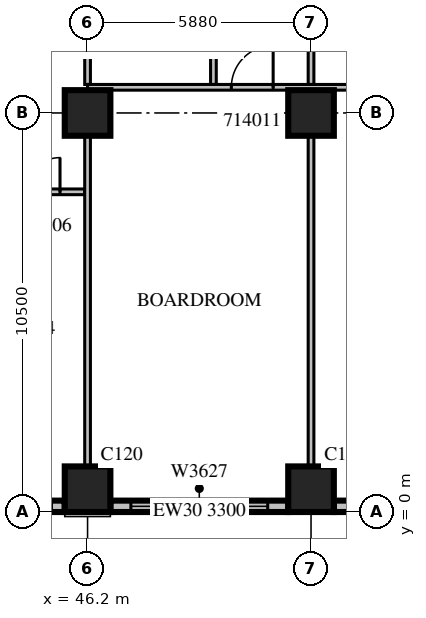
"""IFC4 building model, lengths in metres.
Left out: names, types, materials, properties, quantities, classifications, styles, units other than length and angle.
Written with IfcOpenShell. Run it as: python <this file> out.ifc"""

import sys

from ifc_helpers import new_model, si_unit, direction, frame, frame_2d, origin, origin_2d, place, context, subcontext, project, spatial, rectangle, extrude, source, transform, mapped, element, fill, save


model = new_model("IFC4")
c1 = context("Model", 3, precision=1e-05, world=origin(), true_north=direction((0.0, 1.0)))
c2 = subcontext(c1, "Body", "Model", "MODEL_VIEW")
j1 = project(units=[si_unit("LENGTHUNIT", "METRE"), si_unit("PLANEANGLEUNIT", "RADIAN")], contexts=[c1])
p1 = place(None, origin())
s1 = spatial("IfcSite", under=j1, at=p1, CompositionType="ELEMENT")
p2 = place(p1, origin())
s2 = spatial("IfcBuilding", under=s1, at=p2, CompositionType="ELEMENT")
p3 = place(p2, frame((0.0, 0.0, 69.9)))
s3 = spatial("IfcBuildingStorey", under=s2, at=p3, CompositionType="ELEMENT", Elevation=69.9)
m1 = source(origin(), c2, "Body", "SweptSolid", [
    extrude(rectangle(XDim=1.2, YDim=1.2, at=origin_2d()), origin(), (0.0, 0.0, 1.0), 4.2),
])
for number, where, z_axis, x_axis in (
    (1, (46.2, 0.6, 0.0), (0.0, 0.0, 1.0), (1.0, 0.0, 0.0)),
    (2, (52.08, 0.6, 0.0), (0.0, 0.0, 1.0), (1.0, 0.0, 0.0)),
    (3, (46.2, 10.5, 0.0), (0.0, 0.0, 1.0), (1.0, 0.0, 0.0)),
    (4, (52.08, 10.5, 0.0), (0.0, 0.0, 1.0), (1.0, 0.0, 0.0)),
):
    element("IfcColumn", number, at=place(p3, frame(where, z_axis=z_axis, x_axis=x_axis)), inside=s3, PredefinedType="COLUMN", context=c2, shape_type="MappedRepresentation", body=[
        mapped(m1, transform((0.0, 0.0, 0.0), scale=1.0)),
    ])
m2 = source(origin(), c2, "Body", "SweptSolid", [
    extrude(rectangle(XDim=1.6, YDim=0.3, at=frame_2d((0.8, 0.0))), origin(), (0.0, 0.0, 1.0), 3.8),
])
p4 = place(p3, frame((44.0, 0.15, 0.0), z_axis=(0.0, 0.0, 1.0), x_axis=(1.0, 0.0, 0.0)))
e5 = element("IfcWall", 5, at=p4, inside=s3, PredefinedType="STANDARD", context=c2, shape_type="MappedRepresentation", body=[
    mapped(m2, transform((0.0, 0.0, 0.0), scale=1.0)),
])
m3 = source(origin(), c2, "Body", "SweptSolid", [
    extrude(rectangle(XDim=0.9, YDim=2.7, at=frame_2d((0.45, 1.35))), frame((0.0, 0.16, 0.0), z_axis=(0.0, -1.0, 0.0), x_axis=(1.0, 0.0, 0.0)), (0.0, 0.0, 1.0), 0.32),
])
p5 = place(p4, frame((0.35, 0.0, 0.6)))
e6 = element("IfcOpeningElement", 6, at=p5, cuts=e5, PredefinedType="OPENING", context=c2, shape_type="MappedRepresentation", body=[
    mapped(m3, transform((0.0, 0.0, 0.0), scale=1.0)),
])
m4 = source(origin(), c2, "Body", "SweptSolid", [
    extrude(rectangle(XDim=4.68, YDim=0.3, at=frame_2d((2.34, 0.0))), origin(), (0.0, 0.0, 1.0), 3.3),
])
p6 = place(p3, frame((46.8, 0.15, 0.0), z_axis=(0.0, 0.0, 1.0), x_axis=(1.0, 0.0, 0.0)))
e7 = element("IfcWall", 7, at=p6, inside=s3, PredefinedType="STANDARD", context=c2, shape_type="MappedRepresentation", body=[
    mapped(m4, transform((0.0, 0.0, 0.0), scale=1.0)),
])
m5 = source(origin(), c2, "Body", "SweptSolid", [
    extrude(rectangle(XDim=3.6, YDim=2.7, at=frame_2d((1.8, 1.35))), frame((0.0, 0.16, 0.0), z_axis=(0.0, -1.0, 0.0), x_axis=(1.0, 0.0, 0.0)), (0.0, 0.0, 1.0), 0.32),
])
p7 = place(p6, frame((0.54, 0.0, 0.6)))
e8 = element("IfcOpeningElement", 8, at=p7, cuts=e7, PredefinedType="OPENING", context=c2, shape_type="MappedRepresentation", body=[
    mapped(m5, transform((0.0, 0.0, 0.0), scale=1.0)),
])
m6 = source(origin(), c2, "Body", "SweptSolid", [
    extrude(rectangle(XDim=4.68, YDim=0.3, at=frame_2d((2.34, 0.0))), origin(), (0.0, 0.0, 1.0), 3.8),
])
p8 = place(p3, frame((52.68, 0.15, 0.0), z_axis=(0.0, 0.0, 1.0), x_axis=(1.0, 0.0, 0.0)))
e9 = element("IfcWall", 9, at=p8, inside=s3, PredefinedType="STANDARD", context=c2, shape_type="MappedRepresentation", body=[
    mapped(m6, transform((0.0, 0.0, 0.0), scale=1.0)),
])
p9 = place(p8, frame((0.54, 0.0, 0.6)))
e10 = element("IfcOpeningElement", 10, at=p9, cuts=e9, PredefinedType="OPENING", context=c2, shape_type="MappedRepresentation", body=[
    mapped(m5, transform((0.0, 0.0, 0.0), scale=1.0)),
])
m7 = source(origin(), c2, "Body", "SweptSolid", [
    extrude(rectangle(XDim=2.2, YDim=0.15, at=frame_2d((1.1, 0.0))), origin(), (0.0, 0.0, 1.0), 3.8),
])
p10 = place(p3, frame((46.125, 8.425, 0.0), z_axis=(0.0, 0.0, 1.0), x_axis=(-1.0, 0.0, 0.0)))
e11 = element("IfcWall", 11, at=p10, inside=s3, PredefinedType="PARTITIONING", context=c2, shape_type="MappedRepresentation", body=[
    mapped(m7, transform((0.0, 0.0, 0.0), scale=1.0)),
])
m8 = source(origin(), c2, "Body", "SweptSolid", [
    extrude(rectangle(XDim=0.9, YDim=2.1, at=frame_2d((0.45, 1.05))), frame((0.0, 0.085, 0.0), z_axis=(0.0, -1.0, 0.0), x_axis=(1.0, 0.0, 0.0)), (0.0, 0.0, 1.0), 0.17),
])
p11 = place(p10, frame((0.65, 0.0, 0.0)))
e12 = element("IfcOpeningElement", 12, at=p11, cuts=e11, PredefinedType="OPENING", context=c2, shape_type="MappedRepresentation", body=[
    mapped(m8, transform((0.0, 0.0, 0.0), scale=1.0)),
])
m9 = source(origin(), c2, "Body", "SweptSolid", [
    extrude(rectangle(XDim=3.75, YDim=0.15, at=frame_2d((1.875, 0.0))), origin(), (0.0, 0.0, 1.0), 3.8),
])
p12 = place(p3, frame((49.512, 11.25, 0.0), z_axis=(0.0, 0.0, 1.0), x_axis=(0.0, 1.0, 0.0)))
e13 = element("IfcWall", 13, at=p12, inside=s3, PredefinedType="PARTITIONING", context=c2, shape_type="MappedRepresentation", body=[
    mapped(m9, transform((0.0, 0.0, 0.0), scale=1.0)),
])
m10 = source(origin(), c2, "Body", "SweptSolid", [
    extrude(rectangle(XDim=8.702, YDim=0.15, at=frame_2d((4.351, 0.0))), origin(), (0.0, 0.0, 1.0), 3.8),
])
p13 = place(p3, frame((46.2, 1.199, 0.0), z_axis=(0.0, 0.0, 1.0), x_axis=(0.0, 1.0, 0.0)))
e14 = element("IfcWall", 14, at=p13, inside=s3, PredefinedType="PARTITIONING", context=c2, shape_type="MappedRepresentation", body=[
    mapped(m10, transform((0.0, 0.0, 0.0), scale=1.0)),
])
p14 = place(p3, frame((46.2, 11.25, 0.0), z_axis=(0.0, 0.0, 1.0), x_axis=(0.0, 1.0, 0.0)))
e15 = element("IfcWall", 15, at=p14, inside=s3, PredefinedType="PARTITIONING", context=c2, shape_type="MappedRepresentation", body=[
    mapped(m9, transform((0.0, 0.0, 0.0), scale=1.0)),
])
p15 = place(p3, frame((52.08, 1.199, 0.0), z_axis=(0.0, 0.0, 1.0), x_axis=(0.0, 1.0, 0.0)))
e16 = element("IfcWall", 16, at=p15, inside=s3, PredefinedType="PARTITIONING", context=c2, shape_type="MappedRepresentation", body=[
    mapped(m10, transform((0.0, 0.0, 0.0), scale=1.0)),
])
p16 = place(p3, frame((52.08, 11.25, 0.0), z_axis=(0.0, 0.0, 1.0), x_axis=(0.0, 1.0, 0.0)))
e17 = element("IfcWall", 17, at=p16, inside=s3, PredefinedType="PARTITIONING", context=c2, shape_type="MappedRepresentation", body=[
    mapped(m9, transform((0.0, 0.0, 0.0), scale=1.0)),
])
m11 = source(origin(), c2, "Body", "SweptSolid", [
    extrude(rectangle(XDim=24.9, YDim=0.15, at=frame_2d((12.45, 0.0))), origin(), (0.0, 0.0, 1.0), 3.3),
])
p17 = place(p3, frame((71.1, 11.175, 0.0), z_axis=(0.0, 0.0, 1.0), x_axis=(-1.0, 0.0, 0.0)))
e18 = element("IfcWall", 18, at=p17, inside=s3, PredefinedType="PARTITIONING", context=c2, shape_type="MappedRepresentation", body=[
    mapped(m11, transform((0.0, 0.0, 0.0), scale=1.0)),
])
m12 = source(origin(), c2, "Body", "SweptSolid", [
    extrude(rectangle(XDim=1.1, YDim=2.1, at=frame_2d((0.55, 1.05))), frame((0.0, 0.085, 0.0), z_axis=(0.0, -1.0, 0.0), x_axis=(1.0, 0.0, 0.0)), (0.0, 0.0, 1.0), 0.17),
])
p18 = place(p17, frame((20.017, 0.0, 0.0)))
e19 = element("IfcOpeningElement", 19, at=p18, cuts=e18, PredefinedType="OPENING", context=c2, shape_type="MappedRepresentation", body=[
    mapped(m12, transform((0.0, 0.0, 0.0), scale=1.0)),
])
p19 = place(p17, frame((16.481, 0.0, 0.0)))
e20 = element("IfcOpeningElement", 20, at=p19, cuts=e18, PredefinedType="OPENING", context=c2, shape_type="MappedRepresentation", body=[
    mapped(m12, transform((0.0, 0.0, 0.0), scale=1.0)),
])
p20 = place(p17, frame((4.607, 0.0, 0.0)))
e21 = element("IfcOpeningElement", 21, at=p20, cuts=e18, PredefinedType="OPENING", context=c2, shape_type="MappedRepresentation", body=[
    mapped(m8, transform((0.0, 0.0, 0.0), scale=1.0)),
])
p21 = place(p17, frame((2.243, 0.0, 0.0)))
e22 = element("IfcOpeningElement", 22, at=p21, cuts=e18, PredefinedType="OPENING", context=c2, shape_type="MappedRepresentation", body=[
    mapped(m8, transform((0.0, 0.0, 0.0), scale=1.0)),
])
m13 = source(origin(), c2, "Body", "SweptSolid", [
    extrude(rectangle(XDim=3.6, YDim=2.7, at=frame_2d((1.8, 1.35))), frame((0.0, 0.03, 0.0), z_axis=(0.0, -1.0, 0.0), x_axis=(1.0, 0.0, 0.0)), (0.0, 0.0, 1.0), 0.06),
])
p22 = place(p7, origin())
e23 = element("IfcWindow", 23, at=p22, inside=s3, PartitioningType="SINGLE_PANEL", PredefinedType="WINDOW", context=c2, shape_type="MappedRepresentation", body=[
    mapped(m13, transform((0.0, 0.0, 0.0), scale=1.0)),
])
fill(e8, e23)
m14 = source(origin(), c2, "Body", "SweptSolid", [
    extrude(rectangle(XDim=0.9, YDim=2.1, at=frame_2d((0.45, 1.05))), frame((0.0, 0.025, 0.0), z_axis=(0.0, -1.0, 0.0), x_axis=(1.0, 0.0, 0.0)), (0.0, 0.0, 1.0), 0.05),
])
p23 = place(p11, origin())
e24 = element("IfcDoor", 24, at=p23, inside=s3, OperationType="SINGLE_SWING_RIGHT", PredefinedType="DOOR", context=c2, shape_type="MappedRepresentation", body=[
    mapped(m14, transform((0.0, 0.0, 0.0), scale=1.0)),
])
fill(e12, e24)
m15 = source(origin(), c2, "Body", "SweptSolid", [
    extrude(rectangle(XDim=1.1, YDim=2.1, at=frame_2d((0.55, 1.05))), frame((0.0, 0.025, 0.0), z_axis=(0.0, -1.0, 0.0), x_axis=(1.0, 0.0, 0.0)), (0.0, 0.0, 1.0), 0.05),
])
p24 = place(p18, origin())
e25 = element("IfcDoor", 25, at=p24, inside=s3, OperationType="SINGLE_SWING_RIGHT", PredefinedType="DOOR", context=c2, shape_type="MappedRepresentation", body=[
    mapped(m15, transform((0.0, 0.0, 0.0), scale=1.0)),
])
fill(e19, e25)
save(model, sys.argv[1])
